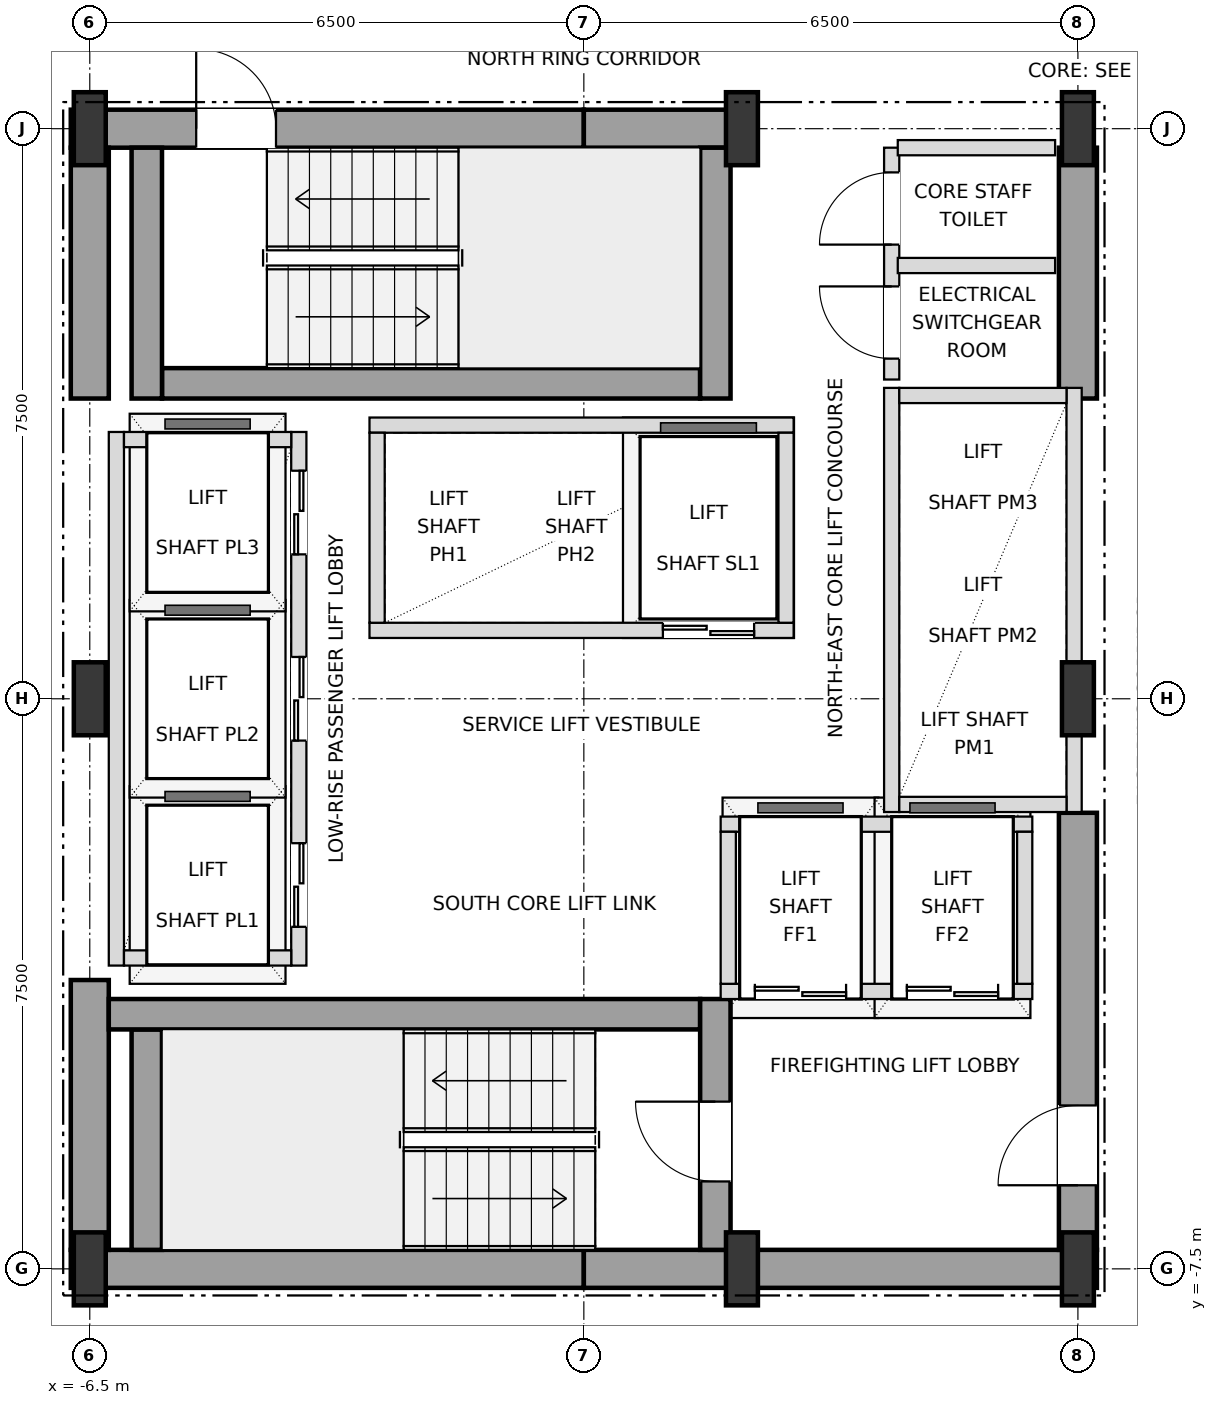
"""IFC4 building model, lengths in metres.
Left out: names, types, materials, properties, quantities, classifications, styles, units other than length and angle.
Written with IfcOpenShell. Run it as: python <this file> out.ifc"""

import sys

from ifc_helpers import new_model, si_unit, direction, frame, frame_2d, origin, origin_2d, place, context, subcontext, project, spatial, rectangle, i_section, extrude, element, fill, save


model = new_model("IFC4")
c1 = context("Model", 3, precision=1e-05, world=origin(), true_north=direction((0.0, 1.0)))
c2 = subcontext(c1, "Body", "Model", "MODEL_VIEW")
j1 = project(units=[si_unit("LENGTHUNIT", "METRE"), si_unit("PLANEANGLEUNIT", "RADIAN")], contexts=[c1])
p1 = place(None, origin())
s1 = spatial("IfcSite", under=j1, at=p1, CompositionType="ELEMENT")
p2 = place(p1, origin())
s2 = spatial("IfcBuilding", under=s1, at=p2, CompositionType="ELEMENT")
p3 = place(p2, frame((0.0, 0.0, 90.0)))
s3 = spatial("IfcBuildingStorey", under=s2, at=p3, CompositionType="ELEMENT", Elevation=90.0)
for number, where, z_axis, x_axis in (
    (1, (-6.5, -7.5, 0.0), (0.0, 0.0, 1.0), (1.0, 0.0, 0.0)),
    (2, (2.08, -7.5, 0.0), (0.0, 0.0, 1.0), (1.0, 0.0, 0.0)),
    (3, (6.5, -7.5, 0.0), (0.0, 0.0, 1.0), (1.0, 0.0, 0.0)),
    (4, (-6.5, 0.0, 0.0), (0.0, 0.0, 1.0), (1.0, 0.0, 0.0)),
    (5, (6.5, 0.0, 0.0), (0.0, 0.0, 1.0), (1.0, 0.0, 0.0)),
    (6, (-6.5, 7.5, 0.0), (0.0, 0.0, 1.0), (1.0, 0.0, 0.0)),
    (7, (2.08, 7.5, 0.0), (0.0, 0.0, 1.0), (1.0, 0.0, 0.0)),
    (8, (6.5, 7.5, 0.0), (0.0, 0.0, 1.0), (1.0, 0.0, 0.0)),
):
    element("IfcColumn", number, at=place(p3, frame(where, z_axis=z_axis, x_axis=x_axis)), inside=s3, PredefinedType="COLUMN", context=c2, shape_type="SweptSolid", body=[
        extrude(i_section(OverallWidth=0.42, OverallDepth=0.96, WebThickness=0.022, FlangeThickness=0.034, at=origin_2d()), origin(), (0.0, 0.0, 1.0), 3.6),
    ])
for number, where, z_axis, x_axis in (
    (9, (-6.75, -7.5, 0.0), (0.0, 0.0, 1.0), (1.0, 0.0, 0.0)),
    (10, (0.0, -7.5, 0.0), (0.0, 0.0, 1.0), (1.0, 0.0, 0.0)),
):
    element("IfcWall", number, at=place(p3, frame(where, z_axis=z_axis, x_axis=x_axis)), inside=s3, PredefinedType="SHEAR", context=c2, shape_type="SweptSolid", body=[
        extrude(rectangle(XDim=6.75, YDim=0.5, at=frame_2d((3.375, 0.0))), origin(), (0.0, 0.0, 1.0), 3.3),
    ])
p4 = place(p3, frame((-6.75, 7.5, 0.0), z_axis=(0.0, 0.0, 1.0), x_axis=(1.0, 0.0, 0.0)))
e11 = element("IfcWall", 11, at=p4, inside=s3, PredefinedType="SHEAR", context=c2, shape_type="SweptSolid", body=[
    extrude(rectangle(XDim=6.75, YDim=0.5, at=frame_2d((3.375, 0.0))), origin(), (0.0, 0.0, 1.0), 3.3),
])
p5 = place(p4, frame((1.65, 0.0, 0.0)))
e12 = element("IfcOpeningElement", 12, at=p5, cuts=e11, PredefinedType="OPENING", context=c2, shape_type="SweptSolid", body=[
    extrude(rectangle(XDim=1.05, YDim=2.15, at=frame_2d((0.525, 1.075))), frame((0.0, 0.26, 0.0), z_axis=(0.0, -1.0, 0.0), x_axis=(1.0, 0.0, 0.0)), (0.0, 0.0, 1.0), 0.52),
])
p6 = place(p3, frame((0.0, 7.5, 0.0), z_axis=(0.0, 0.0, 1.0), x_axis=(1.0, 0.0, 0.0)))
e13 = element("IfcWall", 13, at=p6, inside=s3, PredefinedType="SHEAR", context=c2, shape_type="SweptSolid", body=[
    extrude(rectangle(XDim=2.08, YDim=0.5, at=frame_2d((1.04, 0.0))), origin(), (0.0, 0.0, 1.0), 3.3),
])
p7 = place(p3, frame((-6.5, -7.25, 0.0), z_axis=(0.0, 0.0, 1.0), x_axis=(0.0, 1.0, 0.0)))
e14 = element("IfcWall", 14, at=p7, inside=s3, PredefinedType="SHEAR", context=c2, shape_type="SweptSolid", body=[
    extrude(rectangle(XDim=3.55, YDim=0.5, at=frame_2d((1.775, 0.0))), origin(), (0.0, 0.0, 1.0), 3.3),
])
p8 = place(p3, frame((-6.5, 3.95, 0.0), z_axis=(0.0, 0.0, 1.0), x_axis=(0.0, 1.0, 0.0)))
e15 = element("IfcWall", 15, at=p8, inside=s3, PredefinedType="SHEAR", context=c2, shape_type="SweptSolid", body=[
    extrude(rectangle(XDim=3.3, YDim=0.5, at=frame_2d((1.65, 0.0))), origin(), (0.0, 0.0, 1.0), 3.3),
])
p9 = place(p3, frame((6.5, -7.25, 0.0), z_axis=(0.0, 0.0, 1.0), x_axis=(0.0, 1.0, 0.0)))
e16 = element("IfcWall", 16, at=p9, inside=s3, PredefinedType="SHEAR", context=c2, shape_type="SweptSolid", body=[
    extrude(rectangle(XDim=5.75, YDim=0.5, at=frame_2d((2.875, 0.0))), origin(), (0.0, 0.0, 1.0), 3.3),
])
p10 = place(p9, frame((0.85, 0.0, 0.0)))
e17 = element("IfcOpeningElement", 17, at=p10, cuts=e16, PredefinedType="OPENING", context=c2, shape_type="SweptSolid", body=[
    extrude(rectangle(XDim=1.05, YDim=2.15, at=frame_2d((0.525, 1.075))), frame((0.0, 0.26, 0.0), z_axis=(0.0, -1.0, 0.0), x_axis=(1.0, 0.0, 0.0)), (0.0, 0.0, 1.0), 0.52),
])
p11 = place(p3, frame((6.5, 3.95, 0.0), z_axis=(0.0, 0.0, 1.0), x_axis=(0.0, 1.0, 0.0)))
e18 = element("IfcWall", 18, at=p11, inside=s3, PredefinedType="SHEAR", context=c2, shape_type="SweptSolid", body=[
    extrude(rectangle(XDim=3.3, YDim=0.5, at=frame_2d((1.65, 0.0))), origin(), (0.0, 0.0, 1.0), 3.3),
])
p12 = place(p3, frame((-5.75, -7.25, 0.0), z_axis=(0.0, 0.0, 1.0), x_axis=(0.0, 1.0, 0.0)))
e19 = element("IfcWall", 19, at=p12, inside=s3, PredefinedType="SHEAR", context=c2, shape_type="SweptSolid", body=[
    extrude(rectangle(XDim=2.9, YDim=0.4, at=frame_2d((1.45, 0.0))), origin(), (0.0, 0.0, 1.0), 3.3),
])
p13 = place(p3, frame((-6.25, -4.15, 0.0), z_axis=(0.0, 0.0, 1.0), x_axis=(1.0, 0.0, 0.0)))
e20 = element("IfcWall", 20, at=p13, inside=s3, PredefinedType="SHEAR", context=c2, shape_type="SweptSolid", body=[
    extrude(rectangle(XDim=7.78, YDim=0.4, at=frame_2d((3.89, 0.0))), origin(), (0.0, 0.0, 1.0), 3.3),
])
p14 = place(p3, frame((1.73, -7.25, 0.0), z_axis=(0.0, 0.0, 1.0), x_axis=(0.0, 1.0, 0.0)))
e21 = element("IfcWall", 21, at=p14, inside=s3, PredefinedType="SHEAR", context=c2, shape_type="SweptSolid", body=[
    extrude(rectangle(XDim=3.3, YDim=0.4, at=frame_2d((1.65, 0.0))), origin(), (0.0, 0.0, 1.0), 3.3),
])
p15 = place(p14, frame((0.9, 0.0, 0.0)))
e22 = element("IfcOpeningElement", 22, at=p15, cuts=e21, PredefinedType="OPENING", context=c2, shape_type="SweptSolid", body=[
    extrude(rectangle(XDim=1.05, YDim=2.15, at=frame_2d((0.525, 1.075))), frame((0.0, 0.21, 0.0), z_axis=(0.0, -1.0, 0.0), x_axis=(1.0, 0.0, 0.0)), (0.0, 0.0, 1.0), 0.42),
])
p16 = place(p3, frame((-5.55, 4.15, 0.0), z_axis=(0.0, 0.0, 1.0), x_axis=(1.0, 0.0, 0.0)))
e23 = element("IfcWall", 23, at=p16, inside=s3, PredefinedType="SHEAR", context=c2, shape_type="SweptSolid", body=[
    extrude(rectangle(XDim=7.08, YDim=0.4, at=frame_2d((3.54, 0.0))), origin(), (0.0, 0.0, 1.0), 3.3),
])
for number, where, z_axis, x_axis in (
    (24, (1.73, 3.95, 0.0), (0.0, 0.0, 1.0), (0.0, 1.0, 0.0)),
    (25, (-5.75, 3.95, 0.0), (0.0, 0.0, 1.0), (0.0, 1.0, 0.0)),
):
    element("IfcWall", number, at=place(p3, frame(where, z_axis=z_axis, x_axis=x_axis)), inside=s3, PredefinedType="SHEAR", context=c2, shape_type="SweptSolid", body=[
        extrude(rectangle(XDim=3.3, YDim=0.4, at=frame_2d((1.65, 0.0))), origin(), (0.0, 0.0, 1.0), 3.3),
    ])
p17 = place(p3, frame((-3.75, -3.51, 0.0), z_axis=(0.0, 0.0, 1.0), x_axis=(0.0, 1.0, 0.0)))
e26 = element("IfcWall", 26, at=p17, inside=s3, PredefinedType="SOLIDWALL", context=c2, shape_type="SweptSolid", body=[
    extrude(rectangle(XDim=7.02, YDim=0.2, at=frame_2d((3.51, 0.0))), origin(), (0.0, 0.0, 1.0), 3.3),
])
p18 = place(p17, frame((0.51, 0.0, 0.0)))
e27 = element("IfcOpeningElement", 27, at=p18, cuts=e26, PredefinedType="OPENING", context=c2, shape_type="SweptSolid", body=[
    extrude(rectangle(XDim=1.1, YDim=2.15, at=frame_2d((0.55, 1.075))), frame((0.0, 0.11, 0.0), z_axis=(0.0, -1.0, 0.0), x_axis=(1.0, 0.0, 0.0)), (0.0, 0.0, 1.0), 0.22),
])
p19 = place(p17, frame((2.96, 0.0, 0.0)))
e28 = element("IfcOpeningElement", 28, at=p19, cuts=e26, PredefinedType="OPENING", context=c2, shape_type="SweptSolid", body=[
    extrude(rectangle(XDim=1.1, YDim=2.15, at=frame_2d((0.55, 1.075))), frame((0.0, 0.11, 0.0), z_axis=(0.0, -1.0, 0.0), x_axis=(1.0, 0.0, 0.0)), (0.0, 0.0, 1.0), 0.22),
])
p20 = place(p17, frame((5.41, 0.0, 0.0)))
e29 = element("IfcOpeningElement", 29, at=p20, cuts=e26, PredefinedType="OPENING", context=c2, shape_type="SweptSolid", body=[
    extrude(rectangle(XDim=1.1, YDim=2.15, at=frame_2d((0.55, 1.075))), frame((0.0, 0.11, 0.0), z_axis=(0.0, -1.0, 0.0), x_axis=(1.0, 0.0, 0.0)), (0.0, 0.0, 1.0), 0.22),
])
p21 = place(p3, frame((-6.15, -3.51, 0.0), z_axis=(0.0, 0.0, 1.0), x_axis=(0.0, 1.0, 0.0)))
e30 = element("IfcWall", 30, at=p21, inside=s3, PredefinedType="SOLIDWALL", context=c2, shape_type="SweptSolid", body=[
    extrude(rectangle(XDim=7.02, YDim=0.2, at=frame_2d((3.51, 0.0))), origin(), (0.0, 0.0, 1.0), 3.3),
])
for number, where, z_axis, x_axis in (
    (31, (-6.05, -3.41, 0.0), (0.0, 0.0, 1.0), (1.0, 0.0, 0.0)),
    (32, (-6.05, 3.41, 0.0), (0.0, 0.0, 1.0), (1.0, 0.0, 0.0)),
):
    element("IfcWall", number, at=place(p3, frame(where, z_axis=z_axis, x_axis=x_axis)), inside=s3, PredefinedType="SOLIDWALL", context=c2, shape_type="SweptSolid", body=[
        extrude(rectangle(XDim=2.2, YDim=0.2, at=frame_2d((1.1, 0.0))), origin(), (0.0, 0.0, 1.0), 3.3),
    ])
p22 = place(p3, frame((4.05, -1.49, 0.0), z_axis=(0.0, 0.0, 1.0), x_axis=(0.0, 1.0, 0.0)))
e33 = element("IfcWall", 33, at=p22, inside=s3, PredefinedType="SOLIDWALL", context=c2, shape_type="SweptSolid", body=[
    extrude(rectangle(XDim=5.58, YDim=0.2, at=frame_2d((2.79, 0.0))), origin(), (0.0, 0.0, 1.0), 3.3),
])
p23 = place(p3, frame((6.45, -1.49, 0.0), z_axis=(0.0, 0.0, 1.0), x_axis=(0.0, 1.0, 0.0)))
e34 = element("IfcWall", 34, at=p23, inside=s3, PredefinedType="SOLIDWALL", context=c2, shape_type="SweptSolid", body=[
    extrude(rectangle(XDim=5.58, YDim=0.2, at=frame_2d((2.79, 0.0))), origin(), (0.0, 0.0, 1.0), 2.736),
])
for number, where, z_axis, x_axis in (
    (35, (4.15, -1.39, 0.0), (0.0, 0.0, 1.0), (1.0, 0.0, 0.0)),
    (36, (4.15, 3.99, 0.0), (0.0, 0.0, 1.0), (1.0, 0.0, 0.0)),
):
    element("IfcWall", number, at=place(p3, frame(where, z_axis=z_axis, x_axis=x_axis)), inside=s3, PredefinedType="SOLIDWALL", context=c2, shape_type="SweptSolid", body=[
        extrude(rectangle(XDim=2.2, YDim=0.2, at=frame_2d((1.1, 0.0))), origin(), (0.0, 0.0, 1.0), 3.3),
    ])
p24 = place(p3, frame((-2.82, 0.9, 0.0), z_axis=(0.0, 0.0, 1.0), x_axis=(1.0, 0.0, 0.0)))
e37 = element("IfcWall", 37, at=p24, inside=s3, PredefinedType="SOLIDWALL", context=c2, shape_type="SweptSolid", body=[
    extrude(rectangle(XDim=5.58, YDim=0.2, at=frame_2d((2.79, 0.0))), origin(), (0.0, 0.0, 1.0), 3.3),
])
p25 = place(p24, frame((3.86, 0.0, 0.0)))
e38 = element("IfcOpeningElement", 38, at=p25, cuts=e37, PredefinedType="OPENING", context=c2, shape_type="SweptSolid", body=[
    extrude(rectangle(XDim=1.2, YDim=2.2, at=frame_2d((0.6, 1.1))), frame((0.0, 0.11, 0.0), z_axis=(0.0, -1.0, 0.0), x_axis=(1.0, 0.0, 0.0)), (0.0, 0.0, 1.0), 0.22),
])
p26 = place(p3, frame((-2.82, 3.6, 0.0), z_axis=(0.0, 0.0, 1.0), x_axis=(1.0, 0.0, 0.0)))
e39 = element("IfcWall", 39, at=p26, inside=s3, PredefinedType="SOLIDWALL", context=c2, shape_type="SweptSolid", body=[
    extrude(rectangle(XDim=5.58, YDim=0.2, at=frame_2d((2.79, 0.0))), origin(), (0.0, 0.0, 1.0), 3.3),
])
for number, where, z_axis, x_axis in (
    (40, (-2.72, 1.0, 0.0), (0.0, 0.0, 1.0), (0.0, 1.0, 0.0)),
    (41, (2.66, 1.0, 0.0), (0.0, 0.0, 1.0), (0.0, 1.0, 0.0)),
):
    element("IfcWall", number, at=place(p3, frame(where, z_axis=z_axis, x_axis=x_axis)), inside=s3, PredefinedType="SOLIDWALL", context=c2, shape_type="SweptSolid", body=[
        extrude(rectangle(XDim=2.5, YDim=0.2, at=frame_2d((1.25, 0.0))), origin(), (0.0, 0.0, 1.0), 3.3),
    ])
p27 = place(p3, frame((1.8, -3.85, 0.0), z_axis=(0.0, 0.0, 1.0), x_axis=(1.0, 0.0, 0.0)))
e42 = element("IfcWall", 42, at=p27, inside=s3, PredefinedType="SOLIDWALL", context=c2, shape_type="SweptSolid", body=[
    extrude(rectangle(XDim=4.1, YDim=0.2, at=frame_2d((2.05, 0.0))), origin(), (0.0, 0.0, 1.0), 3.3),
])
p28 = place(p27, frame((0.45, 0.0, 0.0)))
e43 = element("IfcOpeningElement", 43, at=p28, cuts=e42, PredefinedType="OPENING", context=c2, shape_type="SweptSolid", body=[
    extrude(rectangle(XDim=1.2, YDim=2.2, at=frame_2d((0.6, 1.1))), frame((0.0, 0.11, 0.0), z_axis=(0.0, -1.0, 0.0), x_axis=(1.0, 0.0, 0.0)), (0.0, 0.0, 1.0), 0.22),
])
p29 = place(p27, frame((2.45, 0.0, 0.0)))
e44 = element("IfcOpeningElement", 44, at=p29, cuts=e42, PredefinedType="OPENING", context=c2, shape_type="SweptSolid", body=[
    extrude(rectangle(XDim=1.2, YDim=2.2, at=frame_2d((0.6, 1.1))), frame((0.0, 0.11, 0.0), z_axis=(0.0, -1.0, 0.0), x_axis=(1.0, 0.0, 0.0)), (0.0, 0.0, 1.0), 0.22),
])
p30 = place(p3, frame((1.8, -1.65, 0.0), z_axis=(0.0, 0.0, 1.0), x_axis=(1.0, 0.0, 0.0)))
e45 = element("IfcWall", 45, at=p30, inside=s3, PredefinedType="SOLIDWALL", context=c2, shape_type="SweptSolid", body=[
    extrude(rectangle(XDim=4.1, YDim=0.2, at=frame_2d((2.05, 0.0))), origin(), (0.0, 0.0, 1.0), 3.3),
])
for number, where, z_axis, x_axis in (
    (46, (1.9, -3.75, 0.0), (0.0, 0.0, 1.0), (0.0, 1.0, 0.0)),
    (47, (5.8, -3.75, 0.0), (0.0, 0.0, 1.0), (0.0, 1.0, 0.0)),
):
    element("IfcWall", number, at=place(p3, frame(where, z_axis=z_axis, x_axis=x_axis)), inside=s3, PredefinedType="SOLIDWALL", context=c2, shape_type="SweptSolid", body=[
        extrude(rectangle(XDim=2.0, YDim=0.2, at=frame_2d((1.0, 0.0))), origin(), (0.0, 0.0, 1.0), 3.3),
    ])
p31 = place(p3, frame((4.05, 4.2, 0.0), z_axis=(0.0, 0.0, 1.0), x_axis=(0.0, 1.0, 0.0)))
e48 = element("IfcWall", 48, at=p31, inside=s3, PredefinedType="SOLIDWALL", context=c2, shape_type="SweptSolid", body=[
    extrude(rectangle(XDim=3.05, YDim=0.2, at=frame_2d((1.525, 0.0))), origin(), (0.0, 0.0, 1.0), 3.3),
])
p32 = place(p31, frame((0.275, 0.0, 0.0)))
e49 = element("IfcOpeningElement", 49, at=p32, cuts=e48, PredefinedType="OPENING", context=c2, shape_type="SweptSolid", body=[
    extrude(rectangle(XDim=0.95, YDim=2.15, at=frame_2d((0.475, 1.075))), frame((0.0, 0.11, 0.0), z_axis=(0.0, -1.0, 0.0), x_axis=(1.0, 0.0, 0.0)), (0.0, 0.0, 1.0), 0.22),
])
p33 = place(p31, frame((1.775, 0.0, 0.0)))
e50 = element("IfcOpeningElement", 50, at=p33, cuts=e48, PredefinedType="OPENING", context=c2, shape_type="SweptSolid", body=[
    extrude(rectangle(XDim=0.95, YDim=2.15, at=frame_2d((0.475, 1.075))), frame((0.0, 0.11, 0.0), z_axis=(0.0, -1.0, 0.0), x_axis=(1.0, 0.0, 0.0)), (0.0, 0.0, 1.0), 0.22),
])
for number, where, z_axis, x_axis in (
    (51, (4.13, 5.7, 0.0), (0.0, 0.0, 1.0), (1.0, 0.0, 0.0)),
    (52, (4.13, 7.25, 0.0), (0.0, 0.0, 1.0), (1.0, 0.0, 0.0)),
):
    element("IfcWall", number, at=place(p3, frame(where, z_axis=z_axis, x_axis=x_axis)), inside=s3, PredefinedType="SOLIDWALL", context=c2, shape_type="SweptSolid", body=[
        extrude(rectangle(XDim=2.07, YDim=0.2, at=frame_2d((1.035, 0.0))), origin(), (0.0, 0.0, 1.0), 3.3),
    ])
p34 = place(p10, origin())
e53 = element("IfcDoor", 53, at=p34, inside=s3, OperationType="SINGLE_SWING_LEFT", PredefinedType="DOOR", context=c2, shape_type="SweptSolid", body=[
    extrude(rectangle(XDim=1.05, YDim=2.15, at=frame_2d((0.525, 1.075))), frame((0.0, 0.025, 0.0), z_axis=(0.0, -1.0, 0.0), x_axis=(1.0, 0.0, 0.0)), (0.0, 0.0, 1.0), 0.05),
])
fill(e17, e53)
p35 = place(p15, origin())
e54 = element("IfcDoor", 54, at=p35, inside=s3, OperationType="SINGLE_SWING_RIGHT", PredefinedType="DOOR", context=c2, shape_type="SweptSolid", body=[
    extrude(rectangle(XDim=1.05, YDim=2.15, at=frame_2d((0.525, 1.075))), frame((0.0, 0.025, 0.0), z_axis=(0.0, -1.0, 0.0), x_axis=(1.0, 0.0, 0.0)), (0.0, 0.0, 1.0), 0.05),
])
fill(e22, e54)
p36 = place(p5, origin())
e55 = element("IfcDoor", 55, at=p36, inside=s3, OperationType="SINGLE_SWING_LEFT", PredefinedType="DOOR", context=c2, shape_type="SweptSolid", body=[
    extrude(rectangle(XDim=1.05, YDim=2.15, at=frame_2d((0.525, 1.075))), frame((0.0, 0.025, 0.0), z_axis=(0.0, -1.0, 0.0), x_axis=(1.0, 0.0, 0.0)), (0.0, 0.0, 1.0), 0.05),
])
fill(e12, e55)
p37 = place(p18, origin())
e56 = element("IfcDoor", 56, at=p37, inside=s3, OperationType="DOUBLE_DOOR_SLIDING", PredefinedType="DOOR", context=c2, shape_type="SweptSolid", body=[
    extrude(rectangle(XDim=1.1, YDim=2.15, at=frame_2d((0.55, 1.075))), frame((0.0, 0.025, 0.0), z_axis=(0.0, -1.0, 0.0), x_axis=(1.0, 0.0, 0.0)), (0.0, 0.0, 1.0), 0.05),
])
fill(e27, e56)
p38 = place(p19, origin())
e57 = element("IfcDoor", 57, at=p38, inside=s3, OperationType="DOUBLE_DOOR_SLIDING", PredefinedType="DOOR", context=c2, shape_type="SweptSolid", body=[
    extrude(rectangle(XDim=1.1, YDim=2.15, at=frame_2d((0.55, 1.075))), frame((0.0, 0.025, 0.0), z_axis=(0.0, -1.0, 0.0), x_axis=(1.0, 0.0, 0.0)), (0.0, 0.0, 1.0), 0.05),
])
fill(e28, e57)
p39 = place(p20, origin())
e58 = element("IfcDoor", 58, at=p39, inside=s3, OperationType="DOUBLE_DOOR_SLIDING", PredefinedType="DOOR", context=c2, shape_type="SweptSolid", body=[
    extrude(rectangle(XDim=1.1, YDim=2.15, at=frame_2d((0.55, 1.075))), frame((0.0, 0.025, 0.0), z_axis=(0.0, -1.0, 0.0), x_axis=(1.0, 0.0, 0.0)), (0.0, 0.0, 1.0), 0.05),
])
fill(e29, e58)
p40 = place(p25, origin())
e59 = element("IfcDoor", 59, at=p40, inside=s3, OperationType="DOUBLE_DOOR_SLIDING", PredefinedType="DOOR", context=c2, shape_type="SweptSolid", body=[
    extrude(rectangle(XDim=1.2, YDim=2.2, at=frame_2d((0.6, 1.1))), frame((0.0, 0.025, 0.0), z_axis=(0.0, -1.0, 0.0), x_axis=(1.0, 0.0, 0.0)), (0.0, 0.0, 1.0), 0.05),
])
fill(e38, e59)
p41 = place(p28, origin())
e60 = element("IfcDoor", 60, at=p41, inside=s3, OperationType="DOUBLE_DOOR_SLIDING", PredefinedType="DOOR", context=c2, shape_type="SweptSolid", body=[
    extrude(rectangle(XDim=1.2, YDim=2.2, at=frame_2d((0.6, 1.1))), frame((0.0, 0.025, 0.0), z_axis=(0.0, -1.0, 0.0), x_axis=(1.0, 0.0, 0.0)), (0.0, 0.0, 1.0), 0.05),
])
fill(e43, e60)
p42 = place(p29, origin())
e61 = element("IfcDoor", 61, at=p42, inside=s3, OperationType="DOUBLE_DOOR_SLIDING", PredefinedType="DOOR", context=c2, shape_type="SweptSolid", body=[
    extrude(rectangle(XDim=1.2, YDim=2.2, at=frame_2d((0.6, 1.1))), frame((0.0, 0.025, 0.0), z_axis=(0.0, -1.0, 0.0), x_axis=(1.0, 0.0, 0.0)), (0.0, 0.0, 1.0), 0.05),
])
fill(e44, e61)
p43 = place(p32, origin())
e62 = element("IfcDoor", 62, at=p43, inside=s3, OperationType="SINGLE_SWING_RIGHT", PredefinedType="DOOR", context=c2, shape_type="SweptSolid", body=[
    extrude(rectangle(XDim=0.95, YDim=2.15, at=frame_2d((0.475, 1.075))), frame((0.0, 0.025, 0.0), z_axis=(0.0, -1.0, 0.0), x_axis=(1.0, 0.0, 0.0)), (0.0, 0.0, 1.0), 0.05),
])
fill(e49, e62)
p44 = place(p33, origin())
e63 = element("IfcDoor", 63, at=p44, inside=s3, OperationType="SINGLE_SWING_LEFT", PredefinedType="DOOR", context=c2, shape_type="SweptSolid", body=[
    extrude(rectangle(XDim=0.95, YDim=2.15, at=frame_2d((0.475, 1.075))), frame((0.0, 0.025, 0.0), z_axis=(0.0, -1.0, 0.0), x_axis=(1.0, 0.0, 0.0)), (0.0, 0.0, 1.0), 0.05),
])
fill(e50, e63)
save(model, sys.argv[1])
